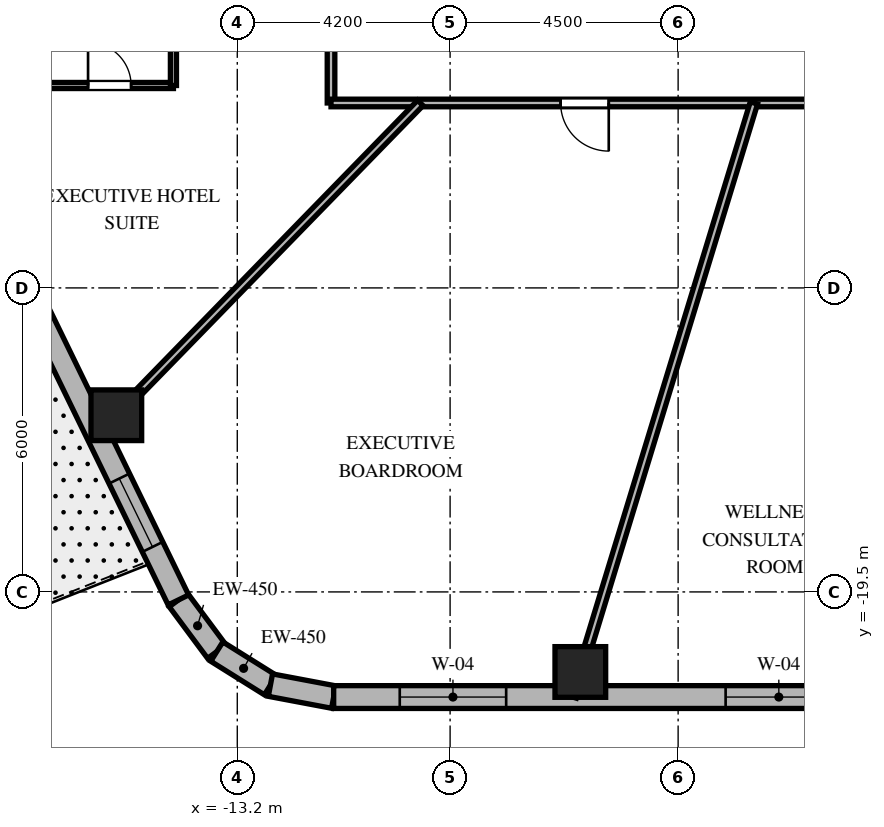
"""IFC4 building model, lengths in metres.
Left out: names, types, materials, properties, quantities, classifications, styles, units other than length and angle.
Written with IfcOpenShell. Run it as: python <this file> out.ifc"""

import sys

from ifc_helpers import new_model, si_unit, direction, frame, frame_2d, origin, origin_2d, place, context, subcontext, project, spatial, rectangle, extrude, element, fill, save


model = new_model("IFC4")
c1 = context("Model", 3, precision=1e-05, world=origin(), true_north=direction((0.0, 1.0)))
c2 = subcontext(c1, "Body", "Model", "MODEL_VIEW")
j1 = project(units=[si_unit("LENGTHUNIT", "METRE"), si_unit("PLANEANGLEUNIT", "RADIAN")], contexts=[c1])
p1 = place(None, origin())
s1 = spatial("IfcSite", under=j1, at=p1, CompositionType="ELEMENT")
p2 = place(p1, origin())
s2 = spatial("IfcBuilding", under=s1, at=p2, CompositionType="ELEMENT")
p3 = place(p2, frame((0.0, 0.0, 236.9)))
s3 = spatial("IfcBuildingStorey", under=s2, at=p3, CompositionType="ELEMENT", Elevation=236.9)
for number, where, z_axis, x_axis in (
    (1, (-6.43, -21.08, 0.0), (0.0, 0.0, 1.0), (1.0, 0.0, 0.0)),
    (2, (-15.587, -16.013, 0.0), (0.0, 0.0, 1.0), (1.0, 0.0, 0.0)),
):
    element("IfcColumn", number, at=place(p3, frame(where, z_axis=z_axis, x_axis=x_axis)), inside=s3, PredefinedType="COLUMN", context=c2, shape_type="SweptSolid", body=[
        extrude(rectangle(XDim=1.0, YDim=1.0, at=origin_2d()), origin(), (0.0, 0.0, 1.0), 3.8),
    ])
p4 = place(p3, frame((-14.362, -19.658, 0.0), z_axis=(0.0, 0.0, 1.0), x_axis=(0.596642462792, -0.80250717853, 0.0)))
e3 = element("IfcWall", 3, at=p4, inside=s3, PredefinedType="SOLIDWALL", context=c2, shape_type="SweptSolid", body=[
    extrude(rectangle(XDim=1.27, YDim=0.45, at=frame_2d((0.635, 0.0))), origin(), (0.0, 0.0, 1.0), 3.5),
])
p5 = place(p3, frame((-13.604, -20.678, 0.0), z_axis=(0.0, 0.0, 1.0), x_axis=(0.847910404124, -0.53013955387, 0.0)))
e4 = element("IfcWall", 4, at=p5, inside=s3, PredefinedType="SOLIDWALL", context=c2, shape_type="SweptSolid", body=[
    extrude(rectangle(XDim=1.249, YDim=0.45, at=frame_2d((0.624, 0.0))), origin(), (0.0, 0.0, 1.0), 3.5),
])
p6 = place(p3, frame((-12.546, -21.34, 0.0), z_axis=(0.0, 0.0, 1.0), x_axis=(0.982686750835, -0.18527479519, 0.0)))
e5 = element("IfcWall", 5, at=p6, inside=s3, PredefinedType="SOLIDWALL", context=c2, shape_type="SweptSolid", body=[
    extrude(rectangle(XDim=1.27, YDim=0.45, at=frame_2d((0.635, 0.0))), origin(), (0.0, 0.0, 1.0), 3.5),
])
p7 = place(p3, frame((-11.298, -21.575, 0.0), z_axis=(0.0, 0.0, 1.0), x_axis=(1.0, 0.0, 0.0)))
e6 = element("IfcWall", 6, at=p7, inside=s3, PredefinedType="SOLIDWALL", context=c2, shape_type="SweptSolid", body=[
    extrude(rectangle(XDim=24.399, YDim=0.45, at=frame_2d((12.2, 0.0))), origin(), (0.0, 0.0, 1.0), 3.5),
])
p8 = place(p7, frame((1.304, 0.0, 0.8)))
e7 = element("IfcOpeningElement", 7, at=p8, cuts=e6, PredefinedType="OPENING", context=c2, shape_type="SweptSolid", body=[
    extrude(rectangle(XDim=2.1, YDim=1.85, at=frame_2d((1.05, 0.925))), frame((0.0, 0.235, 0.0), z_axis=(0.0, -1.0, 0.0), x_axis=(1.0, 0.0, 0.0)), (0.0, 0.0, 1.0), 0.47),
])
p9 = place(p7, frame((7.735, 0.0, 0.8)))
e8 = element("IfcOpeningElement", 8, at=p9, cuts=e6, PredefinedType="OPENING", context=c2, shape_type="SweptSolid", body=[
    extrude(rectangle(XDim=2.1, YDim=1.85, at=frame_2d((1.05, 0.925))), frame((0.0, 0.235, 0.0), z_axis=(0.0, -1.0, 0.0), x_axis=(1.0, 0.0, 0.0)), (0.0, 0.0, 1.0), 0.47),
])
p10 = place(p7, frame((14.488, 0.0, 0.8)))
e9 = element("IfcOpeningElement", 9, at=p10, cuts=e6, PredefinedType="OPENING", context=c2, shape_type="SweptSolid", body=[
    extrude(rectangle(XDim=2.1, YDim=1.85, at=frame_2d((1.05, 0.925))), frame((0.0, 0.235, 0.0), z_axis=(0.0, -1.0, 0.0), x_axis=(1.0, 0.0, 0.0)), (0.0, 0.0, 1.0), 0.47),
])
p11 = place(p7, frame((20.996, 0.0, 0.8)))
e10 = element("IfcOpeningElement", 10, at=p11, cuts=e6, PredefinedType="OPENING", context=c2, shape_type="SweptSolid", body=[
    extrude(rectangle(XDim=2.1, YDim=1.85, at=frame_2d((1.05, 0.925))), frame((0.0, 0.235, 0.0), z_axis=(0.0, -1.0, 0.0), x_axis=(1.0, 0.0, 0.0)), (0.0, 0.0, 1.0), 0.47),
])
p12 = place(p3, frame((-22.74, -2.452, 0.0), z_axis=(0.0, 0.0, 1.0), x_axis=(0.437753424814, -0.899095066755, 0.0)))
e11 = element("IfcWall", 11, at=p12, inside=s3, PredefinedType="SOLIDWALL", context=c2, shape_type="SweptSolid", body=[
    extrude(rectangle(XDim=19.137, YDim=0.45, at=frame_2d((9.569, 0.0))), origin(), (0.0, 0.0, 1.0), 3.5),
])
p13 = place(p12, frame((4.763, 0.0, 0.0)))
e12 = element("IfcOpeningElement", 12, at=p13, cuts=e11, PredefinedType="OPENING", context=c2, shape_type="SweptSolid", body=[
    extrude(rectangle(XDim=0.95, YDim=2.15, at=frame_2d((0.475, 1.075))), frame((0.0, 0.235, 0.0), z_axis=(0.0, -1.0, 0.0), x_axis=(1.0, 0.0, 0.0)), (0.0, 0.0, 1.0), 0.47),
])
p14 = place(p12, frame((1.216, 0.0, 0.8)))
e13 = element("IfcOpeningElement", 13, at=p14, cuts=e11, PredefinedType="OPENING", context=c2, shape_type="SweptSolid", body=[
    extrude(rectangle(XDim=1.5, YDim=1.8, at=frame_2d((0.75, 0.9))), frame((0.0, 0.235, 0.0), z_axis=(0.0, -1.0, 0.0), x_axis=(1.0, 0.0, 0.0)), (0.0, 0.0, 1.0), 0.47),
])
p15 = place(p12, frame((8.87, 0.0, 0.8)))
e14 = element("IfcOpeningElement", 14, at=p15, cuts=e11, PredefinedType="OPENING", context=c2, shape_type="SweptSolid", body=[
    extrude(rectangle(XDim=1.5, YDim=1.8, at=frame_2d((0.75, 0.9))), frame((0.0, 0.235, 0.0), z_axis=(0.0, -1.0, 0.0), x_axis=(1.0, 0.0, 0.0)), (0.0, 0.0, 1.0), 0.47),
])
p16 = place(p12, frame((16.473, 0.0, 0.8)))
e15 = element("IfcOpeningElement", 15, at=p16, cuts=e11, PredefinedType="OPENING", context=c2, shape_type="SweptSolid", body=[
    extrude(rectangle(XDim=1.5, YDim=1.8, at=frame_2d((0.75, 0.9))), frame((0.0, 0.235, 0.0), z_axis=(0.0, -1.0, 0.0), x_axis=(1.0, 0.0, 0.0)), (0.0, 0.0, 1.0), 0.47),
])
p17 = place(p3, frame((-11.35, -9.85, 0.0), z_axis=(0.0, 0.0, 1.0), x_axis=(0.0, 1.0, 0.0)))
e16 = element("IfcWall", 16, at=p17, inside=s3, PredefinedType="PARTITIONING", context=c2, shape_type="SweptSolid", body=[
    extrude(rectangle(XDim=12.4, YDim=0.15, at=frame_2d((6.2, 0.0))), origin(), (0.0, 0.0, 1.0), 2.99),
])
p18 = place(p17, frame((8.835, 0.0, 0.0)))
e17 = element("IfcOpeningElement", 17, at=p18, cuts=e16, PredefinedType="OPENING", context=c2, shape_type="SweptSolid", body=[
    extrude(rectangle(XDim=0.95, YDim=2.03, at=frame_2d((0.475, 1.015))), frame((0.0, 0.085, 0.0), z_axis=(0.0, -1.0, 0.0), x_axis=(1.0, 0.0, 0.0)), (0.0, 0.0, 1.0), 0.17),
])
p19 = place(p17, frame((3.01, 0.0, 0.0)))
e18 = element("IfcOpeningElement", 18, at=p19, cuts=e16, PredefinedType="OPENING", context=c2, shape_type="SweptSolid", body=[
    extrude(rectangle(XDim=0.95, YDim=2.03, at=frame_2d((0.475, 1.015))), frame((0.0, 0.085, 0.0), z_axis=(0.0, -1.0, 0.0), x_axis=(1.0, 0.0, 0.0)), (0.0, 0.0, 1.0), 0.17),
])
p20 = place(p3, frame((-0.92, -9.85, 0.0), z_axis=(0.0, 0.0, 1.0), x_axis=(-1.0, 0.0, 0.0)))
e19 = element("IfcWall", 19, at=p20, inside=s3, PredefinedType="PARTITIONING", context=c2, shape_type="SweptSolid", body=[
    extrude(rectangle(XDim=10.43, YDim=0.15, at=frame_2d((5.215, 0.0))), origin(), (0.0, 0.0, 1.0), 2.99),
])
p21 = place(p20, frame((4.949, 0.0, 0.0)))
e20 = element("IfcOpeningElement", 20, at=p21, cuts=e19, PredefinedType="OPENING", context=c2, shape_type="SweptSolid", body=[
    extrude(rectangle(XDim=0.95, YDim=2.03, at=frame_2d((0.475, 1.015))), frame((0.0, 0.085, 0.0), z_axis=(0.0, -1.0, 0.0), x_axis=(1.0, 0.0, 0.0)), (0.0, 0.0, 1.0), 0.17),
])
p22 = place(p3, frame((-9.588, -9.85, 0.0), z_axis=(0.0, 0.0, 1.0), x_axis=(-0.697519469595, -0.716565830567, 0.0)))
e21 = element("IfcWall", 21, at=p22, inside=s3, PredefinedType="PARTITIONING", context=c2, shape_type="SweptSolid", body=[
    extrude(rectangle(XDim=9.126, YDim=0.15, at=frame_2d((4.563, 0.0))), origin(), (0.0, 0.0, 1.0), 2.74),
])
p23 = place(p3, frame((-3.004, -9.85, 0.0), z_axis=(0.0, 0.0, 1.0), x_axis=(-0.291775760688, -0.956486751333, 0.0)))
e22 = element("IfcWall", 22, at=p23, inside=s3, PredefinedType="PARTITIONING", context=c2, shape_type="SweptSolid", body=[
    extrude(rectangle(XDim=12.258, YDim=0.15, at=frame_2d((6.129, 0.0))), origin(), (0.0, 0.0, 1.0), 2.74),
])
p24 = place(p3, frame((-16.98, -9.505, 0.0), z_axis=(0.0, 0.0, 1.0), x_axis=(1.0, 0.0, 0.0)))
e23 = element("IfcWall", 23, at=p24, inside=s3, PredefinedType="PARTITIONING", context=c2, shape_type="SweptSolid", body=[
    extrude(rectangle(XDim=2.52, YDim=0.12, at=frame_2d((1.26, 0.0))), origin(), (0.0, 0.0, 1.0), 3.027),
])
p25 = place(p24, frame((0.835, 0.0, 0.0)))
e24 = element("IfcOpeningElement", 24, at=p25, cuts=e23, PredefinedType="OPENING", context=c2, shape_type="SweptSolid", body=[
    extrude(rectangle(XDim=0.85, YDim=2.03, at=frame_2d((0.425, 1.015))), frame((0.0, 0.07, 0.0), z_axis=(0.0, -1.0, 0.0), x_axis=(1.0, 0.0, 0.0)), (0.0, 0.0, 1.0), 0.14),
])
p26 = place(p3, frame((-14.46, -9.505, 0.0), z_axis=(0.0, 0.0, 1.0), x_axis=(0.0, 1.0, 0.0)))
e25 = element("IfcWall", 25, at=p26, inside=s3, PredefinedType="PARTITIONING", context=c2, shape_type="SweptSolid", body=[
    extrude(rectangle(XDim=2.68, YDim=0.12, at=frame_2d((1.34, 0.0))), origin(), (0.0, 0.0, 1.0), 3.5),
])
p27 = place(p8, origin())
e26 = element("IfcWindow", 26, at=p27, inside=s3, PartitioningType="SINGLE_PANEL", PredefinedType="WINDOW", context=c2, shape_type="SweptSolid", body=[
    extrude(rectangle(XDim=2.1, YDim=1.85, at=frame_2d((1.05, 0.925))), frame((0.0, 0.03, 0.0), z_axis=(0.0, -1.0, 0.0), x_axis=(1.0, 0.0, 0.0)), (0.0, 0.0, 1.0), 0.06),
])
fill(e7, e26)
p28 = place(p9, origin())
e27 = element("IfcWindow", 27, at=p28, inside=s3, PartitioningType="SINGLE_PANEL", PredefinedType="WINDOW", context=c2, shape_type="SweptSolid", body=[
    extrude(rectangle(XDim=2.1, YDim=1.85, at=frame_2d((1.05, 0.925))), frame((0.0, 0.03, 0.0), z_axis=(0.0, -1.0, 0.0), x_axis=(1.0, 0.0, 0.0)), (0.0, 0.0, 1.0), 0.06),
])
fill(e8, e27)
p29 = place(p16, origin())
e28 = element("IfcWindow", 28, at=p29, inside=s3, PartitioningType="SINGLE_PANEL", PredefinedType="WINDOW", context=c2, shape_type="SweptSolid", body=[
    extrude(rectangle(XDim=1.5, YDim=1.8, at=frame_2d((0.75, 0.9))), frame((0.0, 0.03, 0.0), z_axis=(0.0, -1.0, 0.0), x_axis=(1.0, 0.0, 0.0)), (0.0, 0.0, 1.0), 0.06),
])
fill(e15, e28)
p30 = place(p25, origin())
e29 = element("IfcDoor", 29, at=p30, inside=s3, OperationType="SINGLE_SWING_LEFT", PredefinedType="DOOR", context=c2, shape_type="SweptSolid", body=[
    extrude(rectangle(XDim=0.85, YDim=2.03, at=frame_2d((0.425, 1.015))), frame((0.0, 0.025, 0.0), z_axis=(0.0, -1.0, 0.0), x_axis=(1.0, 0.0, 0.0)), (0.0, 0.0, 1.0), 0.05),
])
fill(e24, e29)
p31 = place(p21, origin())
e30 = element("IfcDoor", 30, at=p31, inside=s3, OperationType="SINGLE_SWING_LEFT", PredefinedType="DOOR", context=c2, shape_type="SweptSolid", body=[
    extrude(rectangle(XDim=0.95, YDim=2.03, at=frame_2d((0.475, 1.015))), frame((0.0, 0.025, 0.0), z_axis=(0.0, -1.0, 0.0), x_axis=(1.0, 0.0, 0.0)), (0.0, 0.0, 1.0), 0.05),
])
fill(e20, e30)
save(model, sys.argv[1])
